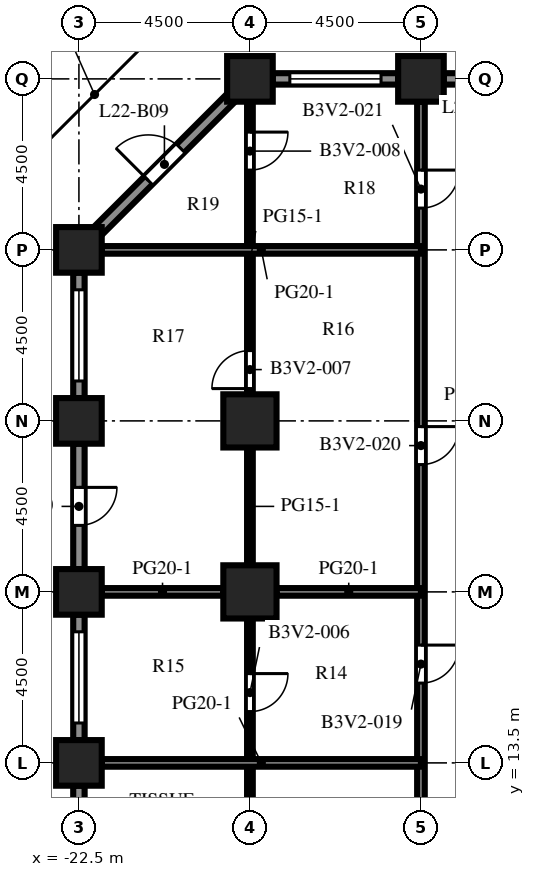
"""IFC4 building model, lengths in metres.
Left out: names, types, materials, properties, quantities, classifications, styles, units other than length and angle.
Written with IfcOpenShell. Run it as: python <this file> out.ifc"""

import sys

from ifc_helpers import new_model, si_unit, direction, frame, frame_2d, origin, origin_2d, place, context, subcontext, project, spatial, rectangle, extrude, element, fill, save


model = new_model("IFC4")
c1 = context("Model", 3, precision=1e-05, world=origin(), true_north=direction((0.0, 1.0)))
c2 = subcontext(c1, "Body", "Model", "MODEL_VIEW")
j1 = project(units=[si_unit("LENGTHUNIT", "METRE"), si_unit("PLANEANGLEUNIT", "RADIAN")], contexts=[c1])
p1 = place(None, origin())
s1 = spatial("IfcSite", under=j1, at=p1, CompositionType="ELEMENT")
p2 = place(p1, origin())
s2 = spatial("IfcBuilding", under=s1, at=p2, CompositionType="ELEMENT")
p3 = place(p2, frame((0.0, 0.0, 98.4)))
s3 = spatial("IfcBuildingStorey", under=s2, at=p3, CompositionType="ELEMENT", Elevation=98.4)
for number, where, z_axis, x_axis in (
    (1, (-22.5, 13.5, 0.0), (0.0, 0.0, 1.0), (1.0, 0.0, 0.0)),
    (2, (-22.5, 18.0, 0.0), (0.0, 0.0, 1.0), (1.0, 0.0, 0.0)),
    (3, (-22.5, 22.5, 0.0), (0.0, 0.0, 1.0), (1.0, 0.0, 0.0)),
    (4, (-22.5, 27.0, 0.0), (0.0, 0.0, 1.0), (1.0, 0.0, 0.0)),
    (5, (-18.0, 31.5, 0.0), (0.0, 0.0, 1.0), (1.0, 0.0, 0.0)),
    (6, (-13.5, 31.5, 0.0), (0.0, 0.0, 1.0), (1.0, 0.0, 0.0)),
):
    element("IfcColumn", number, at=place(p3, frame(where, z_axis=z_axis, x_axis=x_axis)), inside=s3, PredefinedType="COLUMN", context=c2, shape_type="SweptSolid", body=[
        extrude(rectangle(XDim=1.2, YDim=1.2, at=origin_2d()), origin(), (0.0, 0.0, 1.0), 4.1),
    ])
for number, where, z_axis, x_axis in (
    (7, (-18.0, 18.0, 0.0), (0.0, 0.0, 1.0), (1.0, 0.0, 0.0)),
    (8, (-18.0, 22.5, 0.0), (0.0, 0.0, 1.0), (1.0, 0.0, 0.0)),
):
    element("IfcColumn", number, at=place(p3, frame(where, z_axis=z_axis, x_axis=x_axis)), inside=s3, PredefinedType="COLUMN", context=c2, shape_type="SweptSolid", body=[
        extrude(rectangle(XDim=1.4, YDim=1.4, at=origin_2d()), origin(), (0.0, 0.0, 1.0), 4.1),
    ])
p4 = place(p3, frame((-12.9, 31.5, 0.0), z_axis=(0.0, 0.0, 1.0), x_axis=(1.0, 0.0, 0.0)))
e9 = element("IfcWall", 9, at=p4, inside=s3, PredefinedType="SOLIDWALL", context=c2, shape_type="SweptSolid", body=[
    extrude(rectangle(XDim=3.3, YDim=0.3, at=frame_2d((1.65, 0.0))), origin(), (0.0, 0.0, 1.0), 2.75),
])
p5 = place(p4, frame((1.15, 0.0, 0.0)))
e10 = element("IfcOpeningElement", 10, at=p5, cuts=e9, PredefinedType="OPENING", context=c2, shape_type="SweptSolid", body=[
    extrude(rectangle(XDim=1.0, YDim=2.2, at=frame_2d((0.5, 1.1))), frame((0.0, 0.16, 0.0), z_axis=(0.0, -1.0, 0.0), x_axis=(1.0, 0.0, 0.0)), (0.0, 0.0, 1.0), 0.32),
])
p6 = place(p3, frame((-17.4, 31.5, 0.0), z_axis=(0.0, 0.0, 1.0), x_axis=(1.0, 0.0, 0.0)))
e11 = element("IfcWall", 11, at=p6, inside=s3, PredefinedType="SOLIDWALL", context=c2, shape_type="SweptSolid", body=[
    extrude(rectangle(XDim=3.3, YDim=0.3, at=frame_2d((1.65, 0.0))), origin(), (0.0, 0.0, 1.0), 2.75),
])
p7 = place(p6, frame((0.45, 0.0, 0.8)))
e12 = element("IfcOpeningElement", 12, at=p7, cuts=e11, PredefinedType="OPENING", context=c2, shape_type="SweptSolid", body=[
    extrude(rectangle(XDim=2.4, YDim=1.7, at=frame_2d((1.2, 0.85))), frame((0.0, 0.16, 0.0), z_axis=(0.0, -1.0, 0.0), x_axis=(1.0, 0.0, 0.0)), (0.0, 0.0, 1.0), 0.32),
])
p8 = place(p3, frame((-22.006, 27.494, 0.0), z_axis=(0.0, 0.0, 1.0), x_axis=(0.707106781187, 0.707106781187, 0.0)))
e13 = element("IfcWall", 13, at=p8, inside=s3, PredefinedType="SOLIDWALL", context=c2, shape_type="SweptSolid", body=[
    extrude(rectangle(XDim=4.967, YDim=0.3, at=frame_2d((2.483, 0.0))), origin(), (0.0, 0.0, 1.0), 2.75),
])
p9 = place(p8, frame((1.884, 0.0, 0.0)))
e14 = element("IfcOpeningElement", 14, at=p9, cuts=e13, PredefinedType="OPENING", context=c2, shape_type="SweptSolid", body=[
    extrude(rectangle(XDim=1.2, YDim=2.2, at=frame_2d((0.6, 1.1))), frame((0.0, 0.16, 0.0), z_axis=(0.0, -1.0, 0.0), x_axis=(1.0, 0.0, 0.0)), (0.0, 0.0, 1.0), 0.32),
])
p10 = place(p3, frame((-22.5, 23.1, 0.0), z_axis=(0.0, 0.0, 1.0), x_axis=(0.0, 1.0, 0.0)))
e15 = element("IfcWall", 15, at=p10, inside=s3, PredefinedType="SOLIDWALL", context=c2, shape_type="SweptSolid", body=[
    extrude(rectangle(XDim=3.3, YDim=0.3, at=frame_2d((1.65, 0.0))), origin(), (0.0, 0.0, 1.0), 2.75),
])
p11 = place(p10, frame((0.45, 0.0, 0.8)))
e16 = element("IfcOpeningElement", 16, at=p11, cuts=e15, PredefinedType="OPENING", context=c2, shape_type="SweptSolid", body=[
    extrude(rectangle(XDim=2.4, YDim=1.7, at=frame_2d((1.2, 0.85))), frame((0.0, 0.16, 0.0), z_axis=(0.0, -1.0, 0.0), x_axis=(1.0, 0.0, 0.0)), (0.0, 0.0, 1.0), 0.32),
])
p12 = place(p3, frame((-22.5, 18.6, 0.0), z_axis=(0.0, 0.0, 1.0), x_axis=(0.0, 1.0, 0.0)))
e17 = element("IfcWall", 17, at=p12, inside=s3, PredefinedType="SOLIDWALL", context=c2, shape_type="SweptSolid", body=[
    extrude(rectangle(XDim=3.3, YDim=0.3, at=frame_2d((1.65, 0.0))), origin(), (0.0, 0.0, 1.0), 2.75),
])
p13 = place(p12, frame((1.15, 0.0, 0.0)))
e18 = element("IfcOpeningElement", 18, at=p13, cuts=e17, PredefinedType="OPENING", context=c2, shape_type="SweptSolid", body=[
    extrude(rectangle(XDim=1.0, YDim=2.2, at=frame_2d((0.5, 1.1))), frame((0.0, 0.16, 0.0), z_axis=(0.0, -1.0, 0.0), x_axis=(1.0, 0.0, 0.0)), (0.0, 0.0, 1.0), 0.32),
])
p14 = place(p3, frame((-22.5, 14.1, 0.0), z_axis=(0.0, 0.0, 1.0), x_axis=(0.0, 1.0, 0.0)))
e19 = element("IfcWall", 19, at=p14, inside=s3, PredefinedType="SOLIDWALL", context=c2, shape_type="SweptSolid", body=[
    extrude(rectangle(XDim=3.3, YDim=0.3, at=frame_2d((1.65, 0.0))), origin(), (0.0, 0.0, 1.0), 2.75),
])
p15 = place(p14, frame((0.45, 0.0, 0.8)))
e20 = element("IfcOpeningElement", 20, at=p15, cuts=e19, PredefinedType="OPENING", context=c2, shape_type="SweptSolid", body=[
    extrude(rectangle(XDim=2.4, YDim=1.7, at=frame_2d((1.2, 0.85))), frame((0.0, 0.16, 0.0), z_axis=(0.0, -1.0, 0.0), x_axis=(1.0, 0.0, 0.0)), (0.0, 0.0, 1.0), 0.32),
])
p16 = place(p3, frame((-22.5, 9.6, 0.0), z_axis=(0.0, 0.0, 1.0), x_axis=(0.0, 1.0, 0.0)))
e21 = element("IfcWall", 21, at=p16, inside=s3, PredefinedType="SOLIDWALL", context=c2, shape_type="SweptSolid", body=[
    extrude(rectangle(XDim=3.3, YDim=0.3, at=frame_2d((1.65, 0.0))), origin(), (0.0, 0.0, 1.0), 2.75),
])
p17 = place(p16, frame((0.45, 0.0, 0.8)))
e22 = element("IfcOpeningElement", 22, at=p17, cuts=e21, PredefinedType="OPENING", context=c2, shape_type="SweptSolid", body=[
    extrude(rectangle(XDim=2.4, YDim=1.7, at=frame_2d((1.2, 0.85))), frame((0.0, 0.16, 0.0), z_axis=(0.0, -1.0, 0.0), x_axis=(1.0, 0.0, 0.0)), (0.0, 0.0, 1.0), 0.32),
])
p18 = place(p3, frame((-18.0, 9.7, 0.0), z_axis=(0.0, 0.0, 1.0), x_axis=(0.0, 1.0, 0.0)))
e23 = element("IfcWall", 23, at=p18, inside=s3, PredefinedType="PARTITIONING", context=c2, shape_type="SweptSolid", body=[
    extrude(rectangle(XDim=7.6, YDim=0.15, at=frame_2d((3.8, 0.0))), origin(), (0.0, 0.0, 1.0), 3.65),
])
p19 = place(p18, frame((5.15, 0.0, 0.0)))
e24 = element("IfcOpeningElement", 24, at=p19, cuts=e23, PredefinedType="OPENING", context=c2, shape_type="SweptSolid", body=[
    extrude(rectangle(XDim=1.0, YDim=2.1, at=frame_2d((0.5, 1.05))), frame((0.0, 0.085, 0.0), z_axis=(0.0, -1.0, 0.0), x_axis=(1.0, 0.0, 0.0)), (0.0, 0.0, 1.0), 0.17),
])
p20 = place(p3, frame((-18.0, 18.7, 0.0), z_axis=(0.0, 0.0, 1.0), x_axis=(0.0, 1.0, 0.0)))
e25 = element("IfcWall", 25, at=p20, inside=s3, PredefinedType="PARTITIONING", context=c2, shape_type="SweptSolid", body=[
    extrude(rectangle(XDim=3.1, YDim=0.15, at=frame_2d((1.55, 0.0))), origin(), (0.0, 0.0, 1.0), 3.65),
])
p21 = place(p3, frame((-18.0, 23.2, 0.0), z_axis=(0.0, 0.0, 1.0), x_axis=(0.0, 1.0, 0.0)))
e26 = element("IfcWall", 26, at=p21, inside=s3, PredefinedType="PARTITIONING", context=c2, shape_type="SweptSolid", body=[
    extrude(rectangle(XDim=7.7, YDim=0.15, at=frame_2d((3.85, 0.0))), origin(), (0.0, 0.0, 1.0), 3.65),
])
p22 = place(p21, frame((0.15, 0.0, 0.0)))
e27 = element("IfcOpeningElement", 27, at=p22, cuts=e26, PredefinedType="OPENING", context=c2, shape_type="SweptSolid", body=[
    extrude(rectangle(XDim=1.0, YDim=2.1, at=frame_2d((0.5, 1.05))), frame((0.0, 0.085, 0.0), z_axis=(0.0, -1.0, 0.0), x_axis=(1.0, 0.0, 0.0)), (0.0, 0.0, 1.0), 0.17),
])
p23 = place(p21, frame((5.9, 0.0, 0.0)))
e28 = element("IfcOpeningElement", 28, at=p23, cuts=e26, PredefinedType="OPENING", context=c2, shape_type="SweptSolid", body=[
    extrude(rectangle(XDim=1.0, YDim=2.1, at=frame_2d((0.5, 1.05))), frame((0.0, 0.085, 0.0), z_axis=(0.0, -1.0, 0.0), x_axis=(1.0, 0.0, 0.0)), (0.0, 0.0, 1.0), 0.17),
])
p24 = place(p3, frame((-13.5, -21.9, 0.0), z_axis=(0.0, 0.0, 1.0), x_axis=(0.0, 1.0, 0.0)))
e29 = element("IfcWall", 29, at=p24, inside=s3, PredefinedType="PARTITIONING", context=c2, shape_type="SweptSolid", body=[
    extrude(rectangle(XDim=52.8, YDim=0.2, at=frame_2d((26.4, 0.0))), origin(), (0.0, 0.0, 1.0), 3.65),
])
p25 = place(p24, frame((0.75, 0.0, 0.0)))
e30 = element("IfcOpeningElement", 30, at=p25, cuts=e29, PredefinedType="OPENING", context=c2, shape_type="SweptSolid", body=[
    extrude(rectangle(XDim=1.0, YDim=2.1, at=frame_2d((0.5, 1.05))), frame((0.0, 0.11, 0.0), z_axis=(0.0, -1.0, 0.0), x_axis=(1.0, 0.0, 0.0)), (0.0, 0.0, 1.0), 0.22),
])
p26 = place(p24, frame((5.0, 0.0, 0.0)))
e31 = element("IfcOpeningElement", 31, at=p26, cuts=e29, PredefinedType="OPENING", context=c2, shape_type="SweptSolid", body=[
    extrude(rectangle(XDim=1.0, YDim=2.1, at=frame_2d((0.5, 1.05))), frame((0.0, 0.11, 0.0), z_axis=(0.0, -1.0, 0.0), x_axis=(1.0, 0.0, 0.0)), (0.0, 0.0, 1.0), 0.22),
])
p27 = place(p24, frame((12.5, 0.0, 0.0)))
e32 = element("IfcOpeningElement", 32, at=p27, cuts=e29, PredefinedType="OPENING", context=c2, shape_type="SweptSolid", body=[
    extrude(rectangle(XDim=1.0, YDim=2.1, at=frame_2d((0.5, 1.05))), frame((0.0, 0.11, 0.0), z_axis=(0.0, -1.0, 0.0), x_axis=(1.0, 0.0, 0.0)), (0.0, 0.0, 1.0), 0.22),
])
p28 = place(p24, frame((19.75, 0.0, 0.0)))
e33 = element("IfcOpeningElement", 33, at=p28, cuts=e29, PredefinedType="OPENING", context=c2, shape_type="SweptSolid", body=[
    extrude(rectangle(XDim=1.0, YDim=2.1, at=frame_2d((0.5, 1.05))), frame((0.0, 0.11, 0.0), z_axis=(0.0, -1.0, 0.0), x_axis=(1.0, 0.0, 0.0)), (0.0, 0.0, 1.0), 0.22),
])
p29 = place(p24, frame((26.0, 0.0, 0.0)))
e34 = element("IfcOpeningElement", 34, at=p29, cuts=e29, PredefinedType="OPENING", context=c2, shape_type="SweptSolid", body=[
    extrude(rectangle(XDim=1.0, YDim=2.1, at=frame_2d((0.5, 1.05))), frame((0.0, 0.11, 0.0), z_axis=(0.0, -1.0, 0.0), x_axis=(1.0, 0.0, 0.0)), (0.0, 0.0, 1.0), 0.22),
])
p30 = place(p24, frame((37.5, 0.0, 0.0)))
e35 = element("IfcOpeningElement", 35, at=p30, cuts=e29, PredefinedType="OPENING", context=c2, shape_type="SweptSolid", body=[
    extrude(rectangle(XDim=1.0, YDim=2.1, at=frame_2d((0.5, 1.05))), frame((0.0, 0.11, 0.0), z_axis=(0.0, -1.0, 0.0), x_axis=(1.0, 0.0, 0.0)), (0.0, 0.0, 1.0), 0.22),
])
p31 = place(p24, frame((43.25, 0.0, 0.0)))
e36 = element("IfcOpeningElement", 36, at=p31, cuts=e29, PredefinedType="OPENING", context=c2, shape_type="SweptSolid", body=[
    extrude(rectangle(XDim=1.0, YDim=2.1, at=frame_2d((0.5, 1.05))), frame((0.0, 0.11, 0.0), z_axis=(0.0, -1.0, 0.0), x_axis=(1.0, 0.0, 0.0)), (0.0, 0.0, 1.0), 0.22),
])
p32 = place(p24, frame((50.0, 0.0, 0.0)))
e37 = element("IfcOpeningElement", 37, at=p32, cuts=e29, PredefinedType="OPENING", context=c2, shape_type="SweptSolid", body=[
    extrude(rectangle(XDim=1.0, YDim=2.1, at=frame_2d((0.5, 1.05))), frame((0.0, 0.11, 0.0), z_axis=(0.0, -1.0, 0.0), x_axis=(1.0, 0.0, 0.0)), (0.0, 0.0, 1.0), 0.22),
])
p33 = place(p3, frame((-21.9, 13.5, 0.0), z_axis=(0.0, 0.0, 1.0), x_axis=(1.0, 0.0, 0.0)))
e38 = element("IfcWall", 38, at=p33, inside=s3, PredefinedType="PARTITIONING", context=c2, shape_type="SweptSolid", body=[
    extrude(rectangle(XDim=8.4, YDim=0.2, at=frame_2d((4.2, 0.0))), origin(), (0.0, 0.0, 1.0), 3.65),
])
p34 = place(p3, frame((-21.9, 18.0, 0.0), z_axis=(0.0, 0.0, 1.0), x_axis=(1.0, 0.0, 0.0)))
e39 = element("IfcWall", 39, at=p34, inside=s3, PredefinedType="PARTITIONING", context=c2, shape_type="SweptSolid", body=[
    extrude(rectangle(XDim=3.2, YDim=0.2, at=frame_2d((1.6, 0.0))), origin(), (0.0, 0.0, 1.0), 3.65),
])
p35 = place(p3, frame((-17.3, 18.0, 0.0), z_axis=(0.0, 0.0, 1.0), x_axis=(1.0, 0.0, 0.0)))
e40 = element("IfcWall", 40, at=p35, inside=s3, PredefinedType="PARTITIONING", context=c2, shape_type="SweptSolid", body=[
    extrude(rectangle(XDim=3.8, YDim=0.2, at=frame_2d((1.9, 0.0))), origin(), (0.0, 0.0, 1.0), 3.65),
])
p36 = place(p3, frame((-21.9, 27.0, 0.0), z_axis=(0.0, 0.0, 1.0), x_axis=(1.0, 0.0, 0.0)))
e41 = element("IfcWall", 41, at=p36, inside=s3, PredefinedType="PARTITIONING", context=c2, shape_type="SweptSolid", body=[
    extrude(rectangle(XDim=8.4, YDim=0.2, at=frame_2d((4.2, 0.0))), origin(), (0.0, 0.0, 1.0), 3.65),
])
p37 = place(p7, origin())
e42 = element("IfcWindow", 42, at=p37, inside=s3, PartitioningType="SINGLE_PANEL", PredefinedType="WINDOW", context=c2, shape_type="SweptSolid", body=[
    extrude(rectangle(XDim=2.4, YDim=1.7, at=frame_2d((1.2, 0.85))), frame((0.0, 0.03, 0.0), z_axis=(0.0, -1.0, 0.0), x_axis=(1.0, 0.0, 0.0)), (0.0, 0.0, 1.0), 0.06),
])
fill(e12, e42)
p38 = place(p9, origin())
e43 = element("IfcDoor", 43, at=p38, inside=s3, OperationType="SINGLE_SWING_LEFT", PredefinedType="DOOR", context=c2, shape_type="SweptSolid", body=[
    extrude(rectangle(XDim=1.2, YDim=2.2, at=frame_2d((0.6, 1.1))), frame((0.0, 0.025, 0.0), z_axis=(0.0, -1.0, 0.0), x_axis=(1.0, 0.0, 0.0)), (0.0, 0.0, 1.0), 0.05),
])
fill(e14, e43)
p39 = place(p11, origin())
e44 = element("IfcWindow", 44, at=p39, inside=s3, PartitioningType="SINGLE_PANEL", PredefinedType="WINDOW", context=c2, shape_type="SweptSolid", body=[
    extrude(rectangle(XDim=2.4, YDim=1.7, at=frame_2d((1.2, 0.85))), frame((0.0, 0.03, 0.0), z_axis=(0.0, -1.0, 0.0), x_axis=(1.0, 0.0, 0.0)), (0.0, 0.0, 1.0), 0.06),
])
fill(e16, e44)
p40 = place(p13, origin())
e45 = element("IfcDoor", 45, at=p40, inside=s3, OperationType="SINGLE_SWING_RIGHT", PredefinedType="DOOR", context=c2, shape_type="SweptSolid", body=[
    extrude(rectangle(XDim=1.0, YDim=2.2, at=frame_2d((0.5, 1.1))), frame((0.0, 0.025, 0.0), z_axis=(0.0, -1.0, 0.0), x_axis=(1.0, 0.0, 0.0)), (0.0, 0.0, 1.0), 0.05),
])
fill(e18, e45)
p41 = place(p15, origin())
e46 = element("IfcWindow", 46, at=p41, inside=s3, PartitioningType="SINGLE_PANEL", PredefinedType="WINDOW", context=c2, shape_type="SweptSolid", body=[
    extrude(rectangle(XDim=2.4, YDim=1.7, at=frame_2d((1.2, 0.85))), frame((0.0, 0.03, 0.0), z_axis=(0.0, -1.0, 0.0), x_axis=(1.0, 0.0, 0.0)), (0.0, 0.0, 1.0), 0.06),
])
fill(e20, e46)
p42 = place(p19, origin())
e47 = element("IfcDoor", 47, at=p42, inside=s3, OperationType="SINGLE_SWING_RIGHT", PredefinedType="DOOR", context=c2, shape_type="SweptSolid", body=[
    extrude(rectangle(XDim=1.0, YDim=2.1, at=frame_2d((0.5, 1.05))), frame((0.0, 0.025, 0.0), z_axis=(0.0, -1.0, 0.0), x_axis=(1.0, 0.0, 0.0)), (0.0, 0.0, 1.0), 0.05),
])
fill(e24, e47)
p43 = place(p22, origin())
e48 = element("IfcDoor", 48, at=p43, inside=s3, OperationType="SINGLE_SWING_LEFT", PredefinedType="DOOR", context=c2, shape_type="SweptSolid", body=[
    extrude(rectangle(XDim=1.0, YDim=2.1, at=frame_2d((0.5, 1.05))), frame((0.0, 0.025, 0.0), z_axis=(0.0, -1.0, 0.0), x_axis=(1.0, 0.0, 0.0)), (0.0, 0.0, 1.0), 0.05),
])
fill(e27, e48)
p44 = place(p23, origin())
e49 = element("IfcDoor", 49, at=p44, inside=s3, OperationType="SINGLE_SWING_RIGHT", PredefinedType="DOOR", context=c2, shape_type="SweptSolid", body=[
    extrude(rectangle(XDim=1.0, YDim=2.1, at=frame_2d((0.5, 1.05))), frame((0.0, 0.025, 0.0), z_axis=(0.0, -1.0, 0.0), x_axis=(1.0, 0.0, 0.0)), (0.0, 0.0, 1.0), 0.05),
])
fill(e28, e49)
p45 = place(p30, origin())
e50 = element("IfcDoor", 50, at=p45, inside=s3, OperationType="SINGLE_SWING_RIGHT", PredefinedType="DOOR", context=c2, shape_type="SweptSolid", body=[
    extrude(rectangle(XDim=1.0, YDim=2.1, at=frame_2d((0.5, 1.05))), frame((0.0, 0.025, 0.0), z_axis=(0.0, -1.0, 0.0), x_axis=(1.0, 0.0, 0.0)), (0.0, 0.0, 1.0), 0.05),
])
fill(e35, e50)
p46 = place(p31, origin())
e51 = element("IfcDoor", 51, at=p46, inside=s3, OperationType="SINGLE_SWING_RIGHT", PredefinedType="DOOR", context=c2, shape_type="SweptSolid", body=[
    extrude(rectangle(XDim=1.0, YDim=2.1, at=frame_2d((0.5, 1.05))), frame((0.0, 0.025, 0.0), z_axis=(0.0, -1.0, 0.0), x_axis=(1.0, 0.0, 0.0)), (0.0, 0.0, 1.0), 0.05),
])
fill(e36, e51)
p47 = place(p32, origin())
e52 = element("IfcDoor", 52, at=p47, inside=s3, OperationType="SINGLE_SWING_RIGHT", PredefinedType="DOOR", context=c2, shape_type="SweptSolid", body=[
    extrude(rectangle(XDim=1.0, YDim=2.1, at=frame_2d((0.5, 1.05))), frame((0.0, 0.025, 0.0), z_axis=(0.0, -1.0, 0.0), x_axis=(1.0, 0.0, 0.0)), (0.0, 0.0, 1.0), 0.05),
])
fill(e37, e52)
save(model, sys.argv[1])
